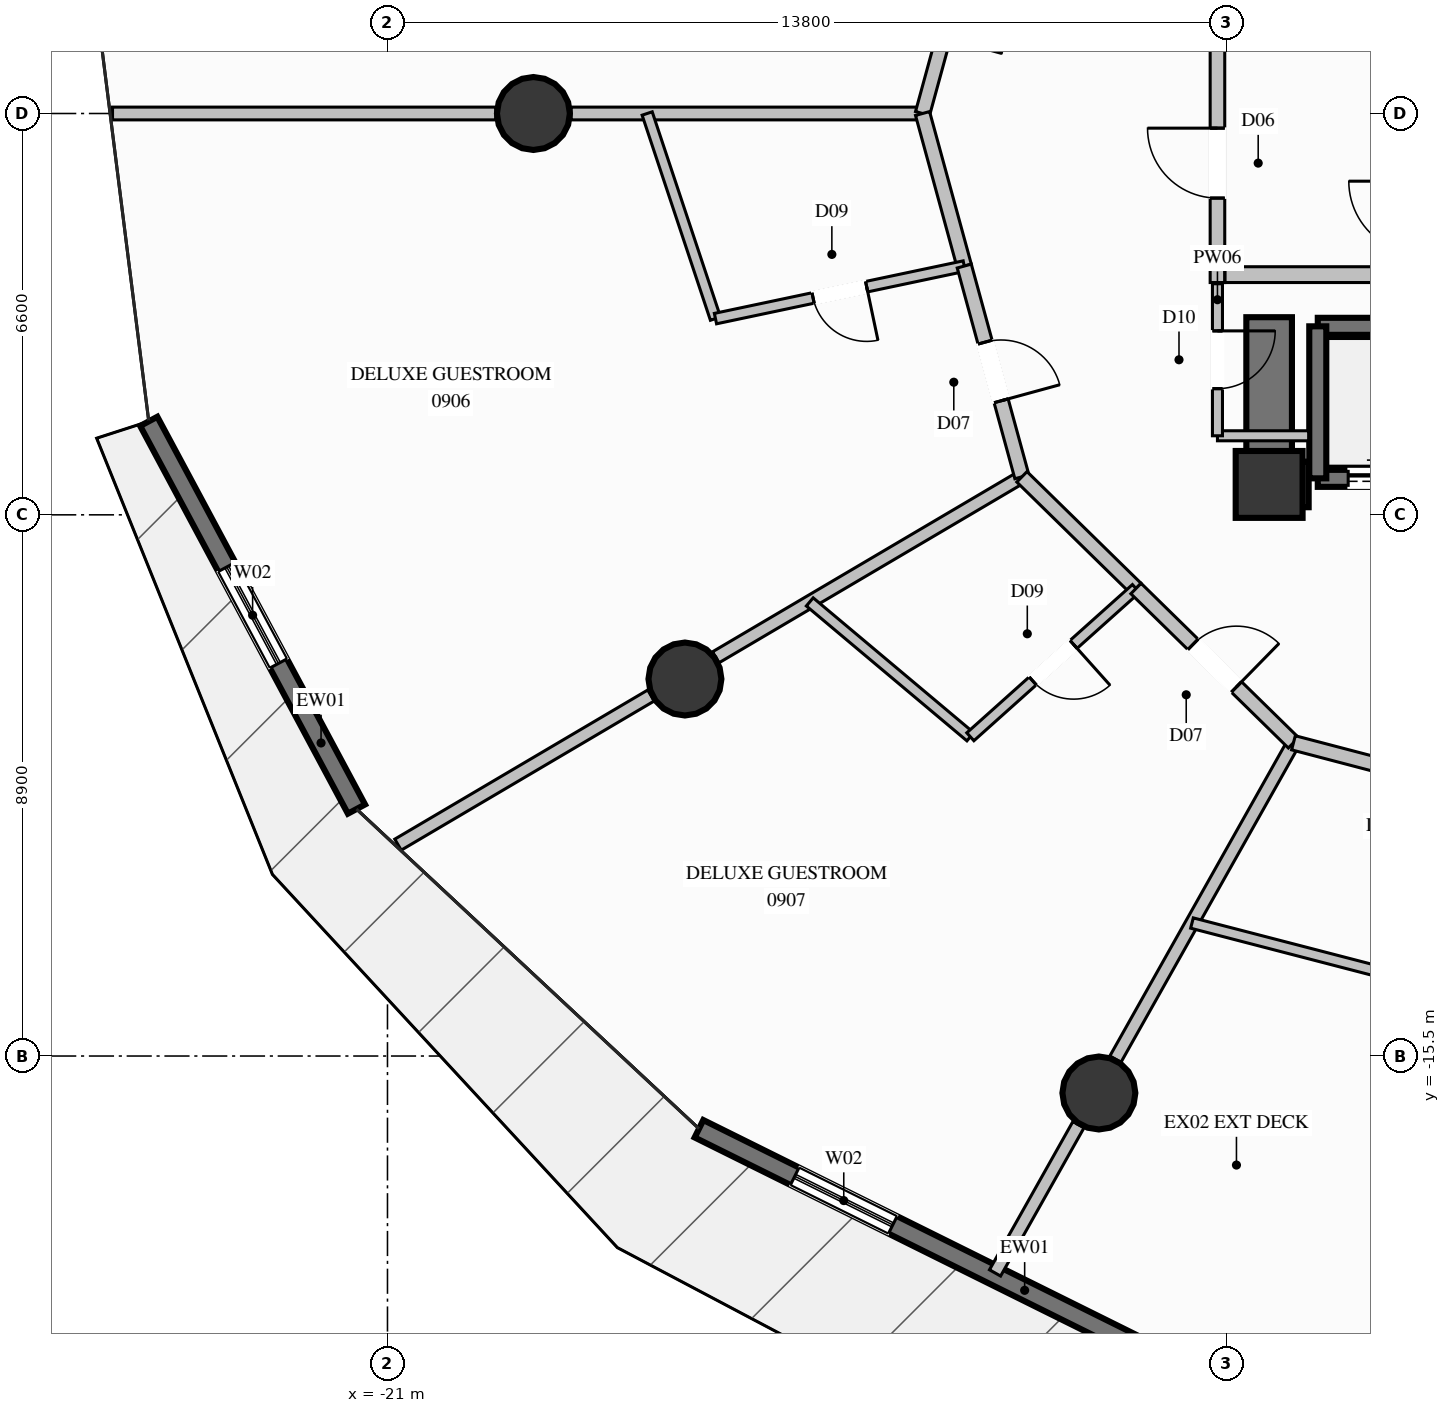
"""IFC4 building model, lengths in metres.
Left out: names, types, materials, properties, quantities, classifications, styles, units other than length and angle.
Written with IfcOpenShell. Run it as: python <this file> out.ifc"""

import sys

from ifc_helpers import new_model, si_unit, direction, frame, frame_2d, origin, origin_2d, place, context, subcontext, project, spatial, rectangle, circle, extrude, element, fill, save


model = new_model("IFC4")
c1 = context("Model", 3, precision=1e-05, world=origin(), true_north=direction((0.0, 1.0)))
c2 = subcontext(c1, "Body", "Model", "MODEL_VIEW")
j1 = project(units=[si_unit("LENGTHUNIT", "METRE"), si_unit("PLANEANGLEUNIT", "RADIAN")], contexts=[c1])
p1 = place(None, origin())
s1 = spatial("IfcSite", under=j1, at=p1, CompositionType="ELEMENT")
p2 = place(p1, origin())
s2 = spatial("IfcBuilding", under=s1, at=p2, CompositionType="ELEMENT")
p3 = place(p2, frame((0.0, 0.0, 35.6)))
s3 = spatial("IfcBuildingStorey", under=s2, at=p3, CompositionType="ELEMENT", Elevation=35.6)
p4 = place(p3, frame((-6.5, -6.1, 0.0), z_axis=(0.0, 0.0, 1.0), x_axis=(1.0, 0.0, 0.0)))
e1 = element("IfcColumn", 1, at=p4, inside=s3, PredefinedType="COLUMN", context=c2, shape_type="SweptSolid", body=[
    extrude(rectangle(XDim=1.1, YDim=1.1, at=origin_2d()), origin(), (0.0, 0.0, 1.0), 3.6),
])
p5 = place(p3, frame((-6.125, -6.1, 0.0), z_axis=(0.0, 0.0, 1.0), x_axis=(1.0, 0.0, 0.0)))
e2 = element("IfcWall", 2, at=p5, inside=s3, PredefinedType="SHEAR", context=c2, shape_type="SweptSolid", body=[
    extrude(rectangle(XDim=0.275, YDim=0.75, at=frame_2d((0.137, 0.0))), origin(), (0.0, 0.0, 1.0), 3.6),
])
p6 = place(p3, frame((-6.5, -6.475, 0.0), z_axis=(0.0, 0.0, 1.0), x_axis=(0.0, 1.0, 0.0)))
e3 = element("IfcWall", 3, at=p6, inside=s3, PredefinedType="SHEAR", context=c2, shape_type="SweptSolid", body=[
    extrude(rectangle(XDim=3.125, YDim=0.75, at=frame_2d((1.562, 0.0))), origin(), (0.0, 0.0, 1.0), 3.6),
])
for number, where, z_axis, x_axis in (
    (4, (-18.6, 0.0, 0.0), (0.0, 0.0, 1.0), (1.0, 0.0, 0.0)),
    (5, (-16.108, -9.3, 0.0), (0.0, 0.0, 1.0), (1.0, 0.0, 0.0)),
    (6, (-9.3, -16.108, 0.0), (0.0, 0.0, 1.0), (1.0, 0.0, 0.0)),
):
    element("IfcColumn", number, at=place(p3, frame(where, z_axis=z_axis, x_axis=x_axis)), inside=s3, PredefinedType="COLUMN", context=c2, shape_type="SweptSolid", body=[
        extrude(circle(Radius=0.6, at=origin_2d()), origin(), (0.0, 0.0, 1.0), 3.6),
    ])
p7 = place(p3, frame((-21.51, -11.439, 0.0), z_axis=(0.0, 0.0, 1.0), x_axis=(-0.472255130515, 0.881461905985, 0.0)))
e7 = element("IfcWall", 7, at=p7, inside=s3, PredefinedType="SOLIDWALL", context=c2, shape_type="SweptSolid", body=[
    extrude(rectangle(XDim=7.233, YDim=0.32, at=frame_2d((3.617, 0.0))), origin(), (0.0, 0.0, 1.0), 3.34),
])
p8 = place(p7, frame((2.717, 0.0, 0.35)))
e8 = element("IfcOpeningElement", 8, at=p8, cuts=e7, PredefinedType="OPENING", context=c2, shape_type="SweptSolid", body=[
    extrude(rectangle(XDim=1.8, YDim=2.6, at=frame_2d((0.9, 1.3))), frame((0.0, 0.17, 0.0), z_axis=(0.0, -1.0, 0.0), x_axis=(1.0, 0.0, 0.0)), (0.0, 0.0, 1.0), 0.34),
])
p9 = place(p3, frame((-8.576, -20.318, 0.0), z_axis=(0.0, 0.0, 1.0), x_axis=(-0.895818759339, 0.444419565743, 0.0)))
e9 = element("IfcWall", 9, at=p9, inside=s3, PredefinedType="SOLIDWALL", context=c2, shape_type="SweptSolid", body=[
    extrude(rectangle(XDim=8.15, YDim=0.32, at=frame_2d((4.075, 0.0))), origin(), (0.0, 0.0, 1.0), 3.34),
])
p10 = place(p9, frame((4.592, 0.0, 0.35)))
e10 = element("IfcOpeningElement", 10, at=p10, cuts=e9, PredefinedType="OPENING", context=c2, shape_type="SweptSolid", body=[
    extrude(rectangle(XDim=1.8, YDim=2.6, at=frame_2d((0.9, 1.3))), frame((0.0, 0.17, 0.0), z_axis=(0.0, -1.0, 0.0), x_axis=(1.0, 0.0, 0.0)), (0.0, 0.0, 1.0), 0.34),
])
p11 = place(p3, frame((-5.7, -6.0, 0.0), z_axis=(0.0, 0.0, 1.0), x_axis=(1.0, 0.0, 0.0)))
e11 = element("IfcWall", 11, at=p11, inside=s3, PredefinedType="SOLIDWALL", context=c2, shape_type="SweptSolid", body=[
    extrude(rectangle(XDim=2.1, YDim=0.28, at=frame_2d((1.05, 0.0))), origin(), (0.0, 0.0, 1.0), 3.34),
])
p12 = place(p11, frame((0.5, 0.0, 0.0)))
e12 = element("IfcOpeningElement", 12, at=p12, cuts=e11, PredefinedType="OPENING", context=c2, shape_type="SweptSolid", body=[
    extrude(rectangle(XDim=1.1, YDim=2.2, at=frame_2d((0.55, 1.1))), frame((0.0, 0.15, 0.0), z_axis=(0.0, -1.0, 0.0), x_axis=(1.0, 0.0, 0.0)), (0.0, 0.0, 1.0), 0.3),
])
p13 = place(p3, frame((-3.6, -3.5, 0.0), z_axis=(0.0, 0.0, 1.0), x_axis=(-1.0, 0.0, 0.0)))
e13 = element("IfcWall", 13, at=p13, inside=s3, PredefinedType="SOLIDWALL", context=c2, shape_type="SweptSolid", body=[
    extrude(rectangle(XDim=2.1, YDim=0.28, at=frame_2d((1.05, 0.0))), origin(), (0.0, 0.0, 1.0), 3.34),
])
p14 = place(p3, frame((-5.7, -3.5, 0.0), z_axis=(0.0, 0.0, 1.0), x_axis=(0.0, -1.0, 0.0)))
e14 = element("IfcWall", 14, at=p14, inside=s3, PredefinedType="SOLIDWALL", context=c2, shape_type="SweptSolid", body=[
    extrude(rectangle(XDim=2.5, YDim=0.28, at=frame_2d((1.25, 0.0))), origin(), (0.0, 0.0, 1.0), 3.34),
])
p15 = place(p3, frame((-7.35, -2.78, 0.0), z_axis=(0.0, 0.0, 1.0), x_axis=(0.0, 1.0, 0.0)))
e15 = element("IfcWall", 15, at=p15, inside=s3, PredefinedType="PARTITIONING", context=c2, shape_type="SweptSolid", body=[
    extrude(rectangle(XDim=5.12, YDim=0.24, at=frame_2d((2.56, 0.0))), origin(), (0.0, 0.0, 1.0), 2.425),
])
p16 = place(p15, frame((1.389, 0.0, 0.0)))
e16 = element("IfcOpeningElement", 16, at=p16, cuts=e15, PredefinedType="OPENING", context=c2, shape_type="SweptSolid", body=[
    extrude(rectangle(XDim=1.15, YDim=2.2, at=frame_2d((0.575, 1.1))), frame((0.0, 0.13, 0.0), z_axis=(0.0, -1.0, 0.0), x_axis=(1.0, 0.0, 0.0)), (0.0, 0.0, 1.0), 0.26),
])
p17 = place(p3, frame((-7.225, -2.65, 0.0), z_axis=(0.0, 0.0, 1.0), x_axis=(1.0, 0.0, 0.0)))
e17 = element("IfcWall", 17, at=p17, inside=s3, PredefinedType="PARTITIONING", context=c2, shape_type="SweptSolid", body=[
    extrude(rectangle(XDim=3.095, YDim=0.26, at=frame_2d((1.548, 0.0))), origin(), (0.0, 0.0, 1.0), 3.34),
])
p18 = place(p3, frame((-7.35, -5.3, 0.0), z_axis=(0.0, 0.0, 1.0), x_axis=(1.0, 0.0, 0.0)))
e18 = element("IfcWall", 18, at=p18, inside=s3, PredefinedType="PARTITIONING", context=c2, shape_type="SweptSolid", body=[
    extrude(rectangle(XDim=1.5, YDim=0.165, at=frame_2d((0.75, 0.0))), origin(), (0.0, 0.0, 1.0), 2.425),
])
p19 = place(p3, frame((-7.35, -2.8, 0.0), z_axis=(0.0, 0.0, 1.0), x_axis=(0.0, -1.0, 0.0)))
e19 = element("IfcWall", 19, at=p19, inside=s3, PredefinedType="PARTITIONING", context=c2, shape_type="SweptSolid", body=[
    extrude(rectangle(XDim=2.5, YDim=0.165, at=frame_2d((1.25, 0.0))), origin(), (0.0, 0.0, 1.0), 3.34),
])
p20 = place(p19, frame((0.775, 0.0, 0.0)))
e20 = element("IfcOpeningElement", 20, at=p20, cuts=e19, PredefinedType="OPENING", context=c2, shape_type="SweptSolid", body=[
    extrude(rectangle(XDim=0.95, YDim=2.1, at=frame_2d((0.475, 1.05))), frame((0.0, 0.093, 0.0), z_axis=(0.0, -1.0, 0.0), x_axis=(1.0, 0.0, 0.0)), (0.0, 0.0, 1.0), 0.185),
])
p21 = place(p3, frame((-12.2, 0.0, 0.0), z_axis=(0.0, 0.0, 1.0), x_axis=(-1.0, 0.0, 0.0)))
e21 = element("IfcWall", 21, at=p21, inside=s3, PredefinedType="PARTITIONING", context=c2, shape_type="SweptSolid", body=[
    extrude(rectangle(XDim=5.78, YDim=0.21, at=frame_2d((2.89, 0.0))), origin(), (0.0, 0.0, 1.0), 2.707),
])
p22 = place(p3, frame((-19.22, 0.0, 0.0), z_axis=(0.0, 0.0, 1.0), x_axis=(-1.0, 0.0, 0.0)))
e22 = element("IfcWall", 22, at=p22, inside=s3, PredefinedType="PARTITIONING", context=c2, shape_type="SweptSolid", body=[
    extrude(rectangle(XDim=6.302, YDim=0.21, at=frame_2d((3.151, 0.0))), origin(), (0.0, 0.0, 1.0), 3.34),
])
p23 = place(p3, frame((-10.566, -5.975, 0.0), z_axis=(0.0, 0.0, 1.0), x_axis=(-0.861473203585, -0.507803032194, 0.0)))
e23 = element("IfcWall", 23, at=p23, inside=s3, PredefinedType="PARTITIONING", context=c2, shape_type="SweptSolid", body=[
    extrude(rectangle(XDim=5.845, YDim=0.21, at=frame_2d((2.922, 0.0))), origin(), (0.0, 0.0, 1.0), 2.707),
])
p24 = place(p3, frame((-16.666, -9.571, 0.0), z_axis=(0.0, 0.0, 1.0), x_axis=(-0.861454358035, -0.50783500177, 0.0)))
e24 = element("IfcWall", 24, at=p24, inside=s3, PredefinedType="PARTITIONING", context=c2, shape_type="SweptSolid", body=[
    extrude(rectangle(XDim=4.83, YDim=0.21, at=frame_2d((2.415, 0.0))), origin(), (0.0, 0.0, 1.0), 3.34),
])
p25 = place(p3, frame((-6.1, -10.349, 0.0), z_axis=(0.0, 0.0, 1.0), x_axis=(-0.490503945764, -0.871438970433, 0.0)))
e25 = element("IfcWall", 25, at=p25, inside=s3, PredefinedType="PARTITIONING", context=c2, shape_type="SweptSolid", body=[
    extrude(rectangle(XDim=5.969, YDim=0.21, at=frame_2d((2.985, 0.0))), origin(), (0.0, 0.0, 1.0), 2.707),
])
p26 = place(p3, frame((-9.636, -16.629, 0.0), z_axis=(0.0, 0.0, 1.0), x_axis=(-0.490451821351, -0.871468307475, 0.0)))
e26 = element("IfcWall", 26, at=p26, inside=s3, PredefinedType="PARTITIONING", context=c2, shape_type="SweptSolid", body=[
    extrude(rectangle(XDim=2.798, YDim=0.21, at=frame_2d((1.399, 0.0))), origin(), (0.0, 0.0, 1.0), 3.34),
])
p27 = place(p3, frame((-11.252, 3.466, 0.0), z_axis=(0.0, 0.0, 1.0), x_axis=(-0.263818706543, -0.96457228349, 0.0)))
e27 = element("IfcWall", 27, at=p27, inside=s3, PredefinedType="PARTITIONING", context=c2, shape_type="SweptSolid", body=[
    extrude(rectangle(XDim=3.593, YDim=0.24, at=frame_2d((1.797, 0.0))), origin(), (0.0, 0.0, 1.0), 3.34),
])
p28 = place(p27, frame((1.297, 0.0, 0.0)))
e28 = element("IfcOpeningElement", 28, at=p28, cuts=e27, PredefinedType="OPENING", context=c2, shape_type="SweptSolid", body=[
    extrude(rectangle(XDim=1.0, YDim=2.2, at=frame_2d((0.5, 1.1))), frame((0.0, 0.13, 0.0), z_axis=(0.0, -1.0, 0.0), x_axis=(1.0, 0.0, 0.0)), (0.0, 0.0, 1.0), 0.26),
])
p29 = place(p3, frame((-12.2, 0.0, 0.0), z_axis=(0.0, 0.0, 1.0), x_axis=(0.263744763784, -0.964592504416, 0.0)))
e29 = element("IfcWall", 29, at=p29, inside=s3, PredefinedType="PARTITIONING", context=c2, shape_type="SweptSolid", body=[
    extrude(rectangle(XDim=2.601, YDim=0.24, at=frame_2d((1.301, 0.0))), origin(), (0.0, 0.0, 1.0), 3.34),
])
p30 = place(p3, frame((-16.729, 0.0, 0.0), z_axis=(0.0, 0.0, 1.0), x_axis=(0.315898114113, -0.948793118388, 0.0)))
e30 = element("IfcWall", 30, at=p30, inside=s3, PredefinedType="PLUMBINGWALL", context=c2, shape_type="SweptSolid", body=[
    extrude(rectangle(XDim=3.555, YDim=0.175, at=frame_2d((1.778, 0.0))), origin(), (0.0, 0.0, 1.0), 3.34),
])
p31 = place(p3, frame((-11.514, -2.509, 0.0), z_axis=(0.0, 0.0, 1.0), x_axis=(-0.978427598238, -0.206590016715, 0.0)))
e31 = element("IfcWall", 31, at=p31, inside=s3, PredefinedType="PLUMBINGWALL", context=c2, shape_type="SweptSolid", body=[
    extrude(rectangle(XDim=4.182, YDim=0.175, at=frame_2d((2.091, 0.0))), origin(), (0.0, 0.0, 1.0), 3.34),
])
p32 = place(p31, frame((1.641, 0.0, 0.0)))
e32 = element("IfcOpeningElement", 32, at=p32, cuts=e31, PredefinedType="OPENING", context=c2, shape_type="SweptSolid", body=[
    extrude(rectangle(XDim=0.9, YDim=2.1, at=frame_2d((0.45, 1.05))), frame((0.0, 0.098, 0.0), z_axis=(0.0, -1.0, 0.0), x_axis=(1.0, 0.0, 0.0)), (0.0, 0.0, 1.0), 0.195),
])
p33 = place(p3, frame((-11.514, -2.509, 0.0), z_axis=(0.0, 0.0, 1.0), x_axis=(0.263818706543, -0.96457228349, 0.0)))
e33 = element("IfcWall", 33, at=p33, inside=s3, PredefinedType="PARTITIONING", context=c2, shape_type="SweptSolid", body=[
    extrude(rectangle(XDim=3.593, YDim=0.24, at=frame_2d((1.797, 0.0))), origin(), (0.0, 0.0, 1.0), 3.34),
])
p34 = place(p33, frame((1.297, 0.0, 0.0)))
e34 = element("IfcOpeningElement", 34, at=p34, cuts=e33, PredefinedType="OPENING", context=c2, shape_type="SweptSolid", body=[
    extrude(rectangle(XDim=1.0, YDim=2.2, at=frame_2d((0.5, 1.1))), frame((0.0, 0.13, 0.0), z_axis=(0.0, -1.0, 0.0), x_axis=(1.0, 0.0, 0.0)), (0.0, 0.0, 1.0), 0.26),
])
p35 = place(p3, frame((-10.566, -5.975, 0.0), z_axis=(0.0, 0.0, 1.0), x_axis=(0.714506552913, -0.699628748584, 0.0)))
e35 = element("IfcWall", 35, at=p35, inside=s3, PredefinedType="PARTITIONING", context=c2, shape_type="SweptSolid", body=[
    extrude(rectangle(XDim=2.625, YDim=0.24, at=frame_2d((1.313, 0.0))), origin(), (0.0, 0.0, 1.0), 3.34),
])
p36 = place(p3, frame((-14.055, -8.032, 0.0), z_axis=(0.0, 0.0, 1.0), x_axis=(0.765749489357, -0.643138958196, 0.0)))
e36 = element("IfcWall", 36, at=p36, inside=s3, PredefinedType="PLUMBINGWALL", context=c2, shape_type="SweptSolid", body=[
    extrude(rectangle(XDim=3.449, YDim=0.175, at=frame_2d((1.724, 0.0))), origin(), (0.0, 0.0, 1.0), 3.34),
])
p37 = place(p3, frame((-8.69, -7.812, 0.0), z_axis=(0.0, 0.0, 1.0), x_axis=(-0.745157470099, -0.666888554975, 0.0)))
e37 = element("IfcWall", 37, at=p37, inside=s3, PredefinedType="PLUMBINGWALL", context=c2, shape_type="SweptSolid", body=[
    extrude(rectangle(XDim=3.656, YDim=0.175, at=frame_2d((1.828, 0.0))), origin(), (0.0, 0.0, 1.0), 3.34),
])
p38 = place(p37, frame((1.378, 0.0, 0.0)))
e38 = element("IfcOpeningElement", 38, at=p38, cuts=e37, PredefinedType="OPENING", context=c2, shape_type="SweptSolid", body=[
    extrude(rectangle(XDim=0.9, YDim=2.1, at=frame_2d((0.45, 1.05))), frame((0.0, 0.098, 0.0), z_axis=(0.0, -1.0, 0.0), x_axis=(1.0, 0.0, 0.0)), (0.0, 0.0, 1.0), 0.195),
])
p39 = place(p3, frame((-8.69, -7.812, 0.0), z_axis=(0.0, 0.0, 1.0), x_axis=(0.714342093268, -0.699796666029, 0.0)))
e39 = element("IfcWall", 39, at=p39, inside=s3, PredefinedType="PARTITIONING", context=c2, shape_type="SweptSolid", body=[
    extrude(rectangle(XDim=3.625, YDim=0.24, at=frame_2d((1.813, 0.0))), origin(), (0.0, 0.0, 1.0), 3.34),
])
p40 = place(p39, frame((1.313, 0.0, 0.0)))
e40 = element("IfcOpeningElement", 40, at=p40, cuts=e39, PredefinedType="OPENING", context=c2, shape_type="SweptSolid", body=[
    extrude(rectangle(XDim=1.0, YDim=2.2, at=frame_2d((0.5, 1.1))), frame((0.0, 0.13, 0.0), z_axis=(0.0, -1.0, 0.0), x_axis=(1.0, 0.0, 0.0)), (0.0, 0.0, 1.0), 0.26),
])
p41 = place(p3, frame((-6.1, -10.349, 0.0), z_axis=(0.0, 0.0, 1.0), x_axis=(0.967291490053, -0.253667446219, 0.0)))
e41 = element("IfcWall", 41, at=p41, inside=s3, PredefinedType="PARTITIONING", context=c2, shape_type="SweptSolid", body=[
    extrude(rectangle(XDim=2.649, YDim=0.24, at=frame_2d((1.324, 0.0))), origin(), (0.0, 0.0, 1.0), 3.34),
])
p42 = place(p3, frame((-7.769, -13.313, 0.0), z_axis=(0.0, 0.0, 1.0), x_axis=(0.96792648556, -0.251233593596, 0.0)))
e42 = element("IfcWall", 42, at=p42, inside=s3, PredefinedType="PLUMBINGWALL", context=c2, shape_type="SweptSolid", body=[
    extrude(rectangle(XDim=3.371, YDim=0.175, at=frame_2d((1.686, 0.0))), origin(), (0.0, 0.0, 1.0), 3.34),
])
p43 = place(p8, origin())
e43 = element("IfcWindow", 43, at=p43, inside=s3, PartitioningType="SINGLE_PANEL", PredefinedType="WINDOW", context=c2, shape_type="SweptSolid", body=[
    extrude(rectangle(XDim=1.8, YDim=2.6, at=frame_2d((0.9, 1.3))), frame((0.0, 0.03, 0.0), z_axis=(0.0, -1.0, 0.0), x_axis=(1.0, 0.0, 0.0)), (0.0, 0.0, 1.0), 0.06),
])
fill(e8, e43)
p44 = place(p10, origin())
e44 = element("IfcWindow", 44, at=p44, inside=s3, PartitioningType="SINGLE_PANEL", PredefinedType="WINDOW", context=c2, shape_type="SweptSolid", body=[
    extrude(rectangle(XDim=1.8, YDim=2.6, at=frame_2d((0.9, 1.3))), frame((0.0, 0.03, 0.0), z_axis=(0.0, -1.0, 0.0), x_axis=(1.0, 0.0, 0.0)), (0.0, 0.0, 1.0), 0.06),
])
fill(e10, e44)
p45 = place(p12, origin())
e45 = element("IfcDoor", 45, at=p45, inside=s3, OperationType="SLIDING_TO_LEFT", PredefinedType="DOOR", context=c2, shape_type="SweptSolid", body=[
    extrude(rectangle(XDim=1.1, YDim=2.2, at=frame_2d((0.55, 1.1))), frame((0.0, 0.025, 0.0), z_axis=(0.0, -1.0, 0.0), x_axis=(1.0, 0.0, 0.0)), (0.0, 0.0, 1.0), 0.05),
])
fill(e12, e45)
p46 = place(p16, origin())
e46 = element("IfcDoor", 46, at=p46, inside=s3, OperationType="SINGLE_SWING_RIGHT", PredefinedType="DOOR", context=c2, shape_type="SweptSolid", body=[
    extrude(rectangle(XDim=1.15, YDim=2.2, at=frame_2d((0.575, 1.1))), frame((0.0, 0.025, 0.0), z_axis=(0.0, -1.0, 0.0), x_axis=(1.0, 0.0, 0.0)), (0.0, 0.0, 1.0), 0.05),
])
fill(e16, e46)
p47 = place(p20, origin())
e47 = element("IfcDoor", 47, at=p47, inside=s3, OperationType="SINGLE_SWING_LEFT", PredefinedType="DOOR", context=c2, shape_type="SweptSolid", body=[
    extrude(rectangle(XDim=0.95, YDim=2.1, at=frame_2d((0.475, 1.05))), frame((0.0, 0.025, 0.0), z_axis=(0.0, -1.0, 0.0), x_axis=(1.0, 0.0, 0.0)), (0.0, 0.0, 1.0), 0.05),
])
fill(e20, e47)
p48 = place(p32, origin())
e48 = element("IfcDoor", 48, at=p48, inside=s3, OperationType="SINGLE_SWING_LEFT", PredefinedType="DOOR", context=c2, shape_type="SweptSolid", body=[
    extrude(rectangle(XDim=0.9, YDim=2.1, at=frame_2d((0.45, 1.05))), frame((0.0, 0.025, 0.0), z_axis=(0.0, -1.0, 0.0), x_axis=(1.0, 0.0, 0.0)), (0.0, 0.0, 1.0), 0.05),
])
fill(e32, e48)
p49 = place(p34, origin())
e49 = element("IfcDoor", 49, at=p49, inside=s3, OperationType="SINGLE_SWING_RIGHT", PredefinedType="DOOR", context=c2, shape_type="SweptSolid", body=[
    extrude(rectangle(XDim=1.0, YDim=2.2, at=frame_2d((0.5, 1.1))), frame((0.0, 0.025, 0.0), z_axis=(0.0, -1.0, 0.0), x_axis=(1.0, 0.0, 0.0)), (0.0, 0.0, 1.0), 0.05),
])
fill(e34, e49)
p50 = place(p38, origin())
e50 = element("IfcDoor", 50, at=p50, inside=s3, OperationType="SINGLE_SWING_LEFT", PredefinedType="DOOR", context=c2, shape_type="SweptSolid", body=[
    extrude(rectangle(XDim=0.9, YDim=2.1, at=frame_2d((0.45, 1.05))), frame((0.0, 0.025, 0.0), z_axis=(0.0, -1.0, 0.0), x_axis=(1.0, 0.0, 0.0)), (0.0, 0.0, 1.0), 0.05),
])
fill(e38, e50)
p51 = place(p40, origin())
e51 = element("IfcDoor", 51, at=p51, inside=s3, OperationType="SINGLE_SWING_RIGHT", PredefinedType="DOOR", context=c2, shape_type="SweptSolid", body=[
    extrude(rectangle(XDim=1.0, YDim=2.2, at=frame_2d((0.5, 1.1))), frame((0.0, 0.025, 0.0), z_axis=(0.0, -1.0, 0.0), x_axis=(1.0, 0.0, 0.0)), (0.0, 0.0, 1.0), 0.05),
])
fill(e40, e51)
save(model, sys.argv[1])
